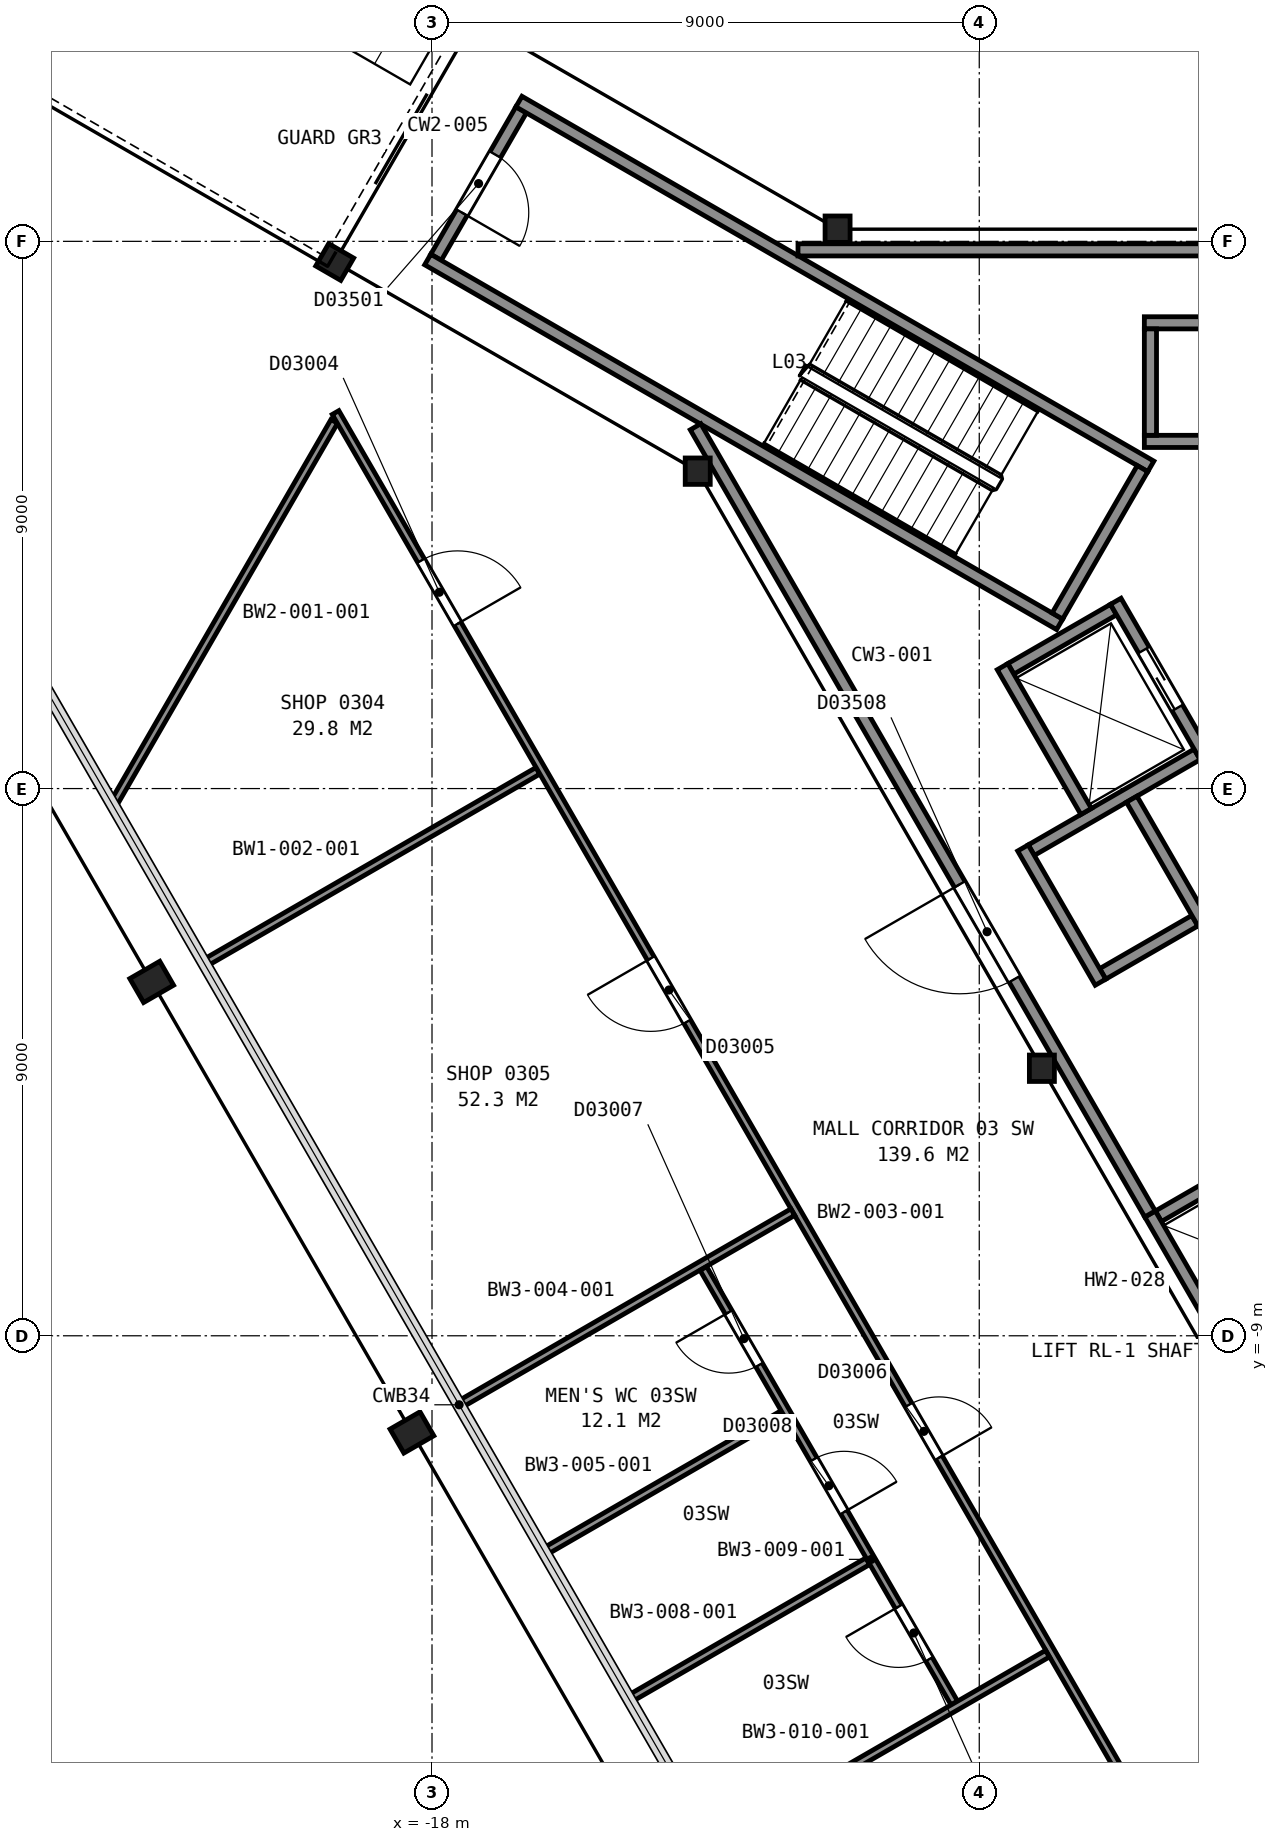
"""IFC4 building model, lengths in metres.
Left out: names, types, materials, properties, quantities, classifications, styles, units other than length and angle.
Written with IfcOpenShell. Run it as: python <this file> out.ifc"""

import sys

from ifc_helpers import new_model, si_unit, direction, frame, frame_2d, origin, origin_2d, place, context, subcontext, project, spatial, rectangle, i_section, extrude, element, fill, save


model = new_model("IFC4")
c1 = context("Model", 3, precision=1e-05, world=origin(), true_north=direction((0.0, 1.0)))
c2 = subcontext(c1, "Body", "Model", "MODEL_VIEW")
j1 = project(units=[si_unit("LENGTHUNIT", "METRE"), si_unit("PLANEANGLEUNIT", "RADIAN")], contexts=[c1])
p1 = place(None, origin())
s1 = spatial("IfcSite", under=j1, at=p1, CompositionType="ELEMENT")
p2 = place(p1, origin())
s2 = spatial("IfcBuilding", under=s1, at=p2, CompositionType="ELEMENT")
p3 = place(p2, frame((0.0, 0.0, 22.4)))
s3 = spatial("IfcBuildingStorey", under=s2, at=p3, CompositionType="ELEMENT", Elevation=22.4)
for number, where, z_axis, x_axis in (
    (1, (-22.61, -3.18, 0.0), (0.0, 0.0, 1.0), (-0.5, 0.866, 0.0)),
    (2, (-18.33, -10.59, 0.0), (0.0, 0.0, 1.0), (-0.5, 0.866, 0.0)),
):
    element("IfcColumn", number, at=place(p3, frame(where, z_axis=z_axis, x_axis=x_axis)), inside=s3, PredefinedType="COLUMN", context=c2, shape_type="SweptSolid", body=[
        extrude(i_section(OverallWidth=0.455, OverallDepth=0.569, WebThickness=0.078, FlangeThickness=0.125, FilletRadius=0.015, at=origin_2d()), origin(), (0.0, 0.0, 1.0), 4.8),
    ])
p4 = place(p3, frame((-11.33, 9.2, 0.0), z_axis=(0.0, 0.0, 1.0), x_axis=(1.0, 0.0, 0.0)))
e3 = element("IfcColumn", 3, at=p4, inside=s3, PredefinedType="COLUMN", context=c2, shape_type="SweptSolid", body=[
    extrude(i_section(OverallWidth=0.411, OverallDepth=0.434, WebThickness=0.036, FlangeThickness=0.057, FilletRadius=0.015, at=origin_2d()), origin(), (0.0, 0.0, 1.0), 4.8),
])
p5 = place(p3, frame((-19.6, 8.66, 0.0), z_axis=(0.0, 0.0, 1.0), x_axis=(0.5, 0.866025403784, 0.0)))
e4 = element("IfcColumn", 4, at=p5, inside=s3, PredefinedType="COLUMN", context=c2, shape_type="SweptSolid", body=[
    extrude(i_section(OverallWidth=0.424, OverallDepth=0.475, WebThickness=0.048, FlangeThickness=0.077, FilletRadius=0.015, at=origin_2d()), origin(), (0.0, 0.0, 1.0), 4.8),
])
for number, where, z_axis, x_axis in (
    (5, (-13.63, 5.22, 0.0), (0.0, 0.0, 1.0), (1.0, 0.0, 0.0)),
    (6, (-7.97, -4.6, 0.0), (0.0, 0.0, 1.0), (1.0, 0.0, 0.0)),
):
    element("IfcColumn", number, at=place(p3, frame(where, z_axis=z_axis, x_axis=x_axis)), inside=s3, PredefinedType="COLUMN", context=c2, shape_type="SweptSolid", body=[
        extrude(i_section(OverallWidth=0.411, OverallDepth=0.434, WebThickness=0.036, FlangeThickness=0.057, FilletRadius=0.015, at=origin_2d()), origin(), (0.0, 0.0, 1.0), 4.8),
    ])
p6 = place(p3, frame((-16.534, 11.162, 0.0), z_axis=(0.0, 0.0, 1.0), x_axis=(-0.49998411664, -0.866034573852, 0.0)))
e7 = element("IfcWall", 7, at=p6, inside=s3, PredefinedType="PARTITIONING", context=c2, shape_type="SweptSolid", body=[
    extrude(rectangle(XDim=2.8, YDim=0.2, at=frame_2d((1.4, 0.0))), origin(), (0.0, 0.0, 1.0), 4.55),
])
p7 = place(p6, frame((0.85, 0.0, 0.0)))
e8 = element("IfcOpeningElement", 8, at=p7, cuts=e7, PredefinedType="OPENING", context=c2, shape_type="SweptSolid", body=[
    extrude(rectangle(XDim=1.1, YDim=2.1, at=frame_2d((0.55, 1.05))), frame((0.0, 0.11, 0.0), z_axis=(0.0, -1.0, 0.0), x_axis=(1.0, 0.0, 0.0)), (0.0, 0.0, 1.0), 0.22),
])
for number, where, z_axis, x_axis in (
    (9, (-7.678, 2.701, 0.0), (0.0, 0.0, 1.0), (-0.866, 0.5, 0.0)),
    (10, (-6.178, 5.299, 0.0), (0.0, 0.0, 1.0), (-0.866, 0.5, 0.0)),
):
    element("IfcWall", number, at=place(p3, frame(where, z_axis=z_axis, x_axis=x_axis)), inside=s3, PredefinedType="PARTITIONING", context=c2, shape_type="SweptSolid", body=[
        extrude(rectangle(XDim=12.0, YDim=0.2, at=frame_2d((6.0, 0.0))), origin(), (0.0, 0.0, 1.0), 4.55),
    ])
p8 = place(p3, frame((-6.315, 5.262, 0.0), z_axis=(0.0, 0.0, 1.0), x_axis=(-0.500049511043, -0.865996816683, 0.0)))
e11 = element("IfcWall", 11, at=p8, inside=s3, PredefinedType="PARTITIONING", context=c2, shape_type="SweptSolid", body=[
    extrude(rectangle(XDim=2.8, YDim=0.2, at=frame_2d((1.4, 0.0))), origin(), (0.0, 0.0, 1.0), 4.55),
])
for number, where, z_axis, x_axis in (
    (12, (-6.285, 5.71, 0.0), (0.0, 0.0, 1.0), (1.0, 0.0, 0.0)),
    (13, (-6.285, 7.66, 0.0), (0.0, 0.0, 1.0), (1.0, 0.0, 0.0)),
):
    element("IfcWall", number, at=place(p3, frame(where, z_axis=z_axis, x_axis=x_axis)), inside=s3, PredefinedType="PARTITIONING", context=c2, shape_type="SweptSolid", body=[
        extrude(rectangle(XDim=2.35, YDim=0.2, at=frame_2d((1.175, 0.0))), origin(), (0.0, 0.0, 1.0), 4.8),
    ])
for number, where, z_axis, x_axis in (
    (14, (-6.054, -7.034, 0.0), (0.0, 0.0, 1.0), (0.866, 0.5, 0.0)),
    (15, (-6.97, -3.048, 0.0), (0.0, 0.0, 1.0), (0.866, 0.5, 0.0)),
):
    element("IfcWall", number, at=place(p3, frame(where, z_axis=z_axis, x_axis=x_axis)), inside=s3, PredefinedType="PARTITIONING", context=c2, shape_type="SweptSolid", body=[
        extrude(rectangle(XDim=1.75, YDim=0.2, at=frame_2d((0.875, 0.0))), origin(), (0.0, 0.0, 1.0), 4.8),
    ])
p9 = place(p3, frame((-8.145, -1.013, 0.0), z_axis=(0.0, 0.0, 1.0), x_axis=(0.866016494683, 0.500015430699, 0.0)))
e16 = element("IfcWall", 16, at=p9, inside=s3, PredefinedType="PARTITIONING", context=c2, shape_type="SweptSolid", body=[
    extrude(rectangle(XDim=3.15, YDim=0.2, at=frame_2d((1.575, 0.0))), origin(), (0.0, 0.0, 1.0), 4.8),
])
p10 = place(p3, frame((-8.48, 1.969, 0.0), z_axis=(0.0, 0.0, 1.0), x_axis=(0.866000020948, 0.500043961785, 0.0)))
e17 = element("IfcWall", 17, at=p10, inside=s3, PredefinedType="PARTITIONING", context=c2, shape_type="SweptSolid", body=[
    extrude(rectangle(XDim=1.95, YDim=0.2, at=frame_2d((0.975, 0.0))), origin(), (0.0, 0.0, 1.0), 4.8),
])
p11 = place(p3, frame((-6.185, 5.81, 0.0), z_axis=(0.0, 0.0, 1.0), x_axis=(0.0, 1.0, 0.0)))
e18 = element("IfcWall", 18, at=p11, inside=s3, PredefinedType="PARTITIONING", context=c2, shape_type="SweptSolid", body=[
    extrude(rectangle(XDim=1.75, YDim=0.2, at=frame_2d((0.875, 0.0))), origin(), (0.0, 0.0, 1.0), 4.8),
])
p12 = place(p3, frame((-5.28, 0.525, 0.0), z_axis=(0.0, 0.0, 1.0), x_axis=(-0.500037662692, 0.866003658127, 0.0)))
e19 = element("IfcWall", 19, at=p12, inside=s3, PredefinedType="PARTITIONING", context=c2, shape_type="SweptSolid", body=[
    extrude(rectangle(XDim=2.95, YDim=0.2, at=frame_2d((1.475, 0.0))), origin(), (0.0, 0.0, 1.0), 4.8),
])
p13 = place(p12, frame((0.925, 0.0, 0.0)))
e20 = element("IfcOpeningElement", 20, at=p13, cuts=e19, PredefinedType="OPENING", context=c2, shape_type="SweptSolid", body=[
    extrude(rectangle(XDim=1.1, YDim=2.1, at=frame_2d((0.55, 1.05))), frame((0.0, 0.11, 0.0), z_axis=(0.0, -1.0, 0.0), x_axis=(1.0, 0.0, 0.0)), (0.0, 0.0, 1.0), 0.22),
])
p14 = place(p3, frame((-5.318, -2.21, 0.0), z_axis=(0.0, 0.0, 1.0), x_axis=(-0.499938297808, 0.866061024631, 0.0)))
e21 = element("IfcWall", 21, at=p14, inside=s3, PredefinedType="PARTITIONING", context=c2, shape_type="SweptSolid", body=[
    extrude(rectangle(XDim=2.35, YDim=0.2, at=frame_2d((1.175, 0.0))), origin(), (0.0, 0.0, 1.0), 4.8),
])
p15 = place(p3, frame((-7.242, -0.376, 0.0), z_axis=(0.0, 0.0, 1.0), x_axis=(-0.499996545922, 0.866027397988, 0.0)))
e22 = element("IfcWall", 22, at=p15, inside=s3, PredefinedType="PARTITIONING", context=c2, shape_type="SweptSolid", body=[
    extrude(rectangle(XDim=2.75, YDim=0.2, at=frame_2d((1.375, 0.0))), origin(), (0.0, 0.0, 1.0), 4.8),
])
for number, where, z_axis, x_axis in (
    (23, (-7.006, -3.185, 0.0), (0.0, 0.0, 1.0), (-0.5, 0.866, 0.0)),
    (24, (-4.916, -9.206, 0.0), (0.0, 0.0, 1.0), (-0.5, 0.866, 0.0)),
):
    element("IfcWall", number, at=place(p3, frame(where, z_axis=z_axis, x_axis=x_axis)), inside=s3, PredefinedType="PARTITIONING", context=c2, shape_type="SweptSolid", body=[
        extrude(rectangle(XDim=2.55, YDim=0.2, at=frame_2d((1.275, 0.0))), origin(), (0.0, 0.0, 1.0), 4.8),
    ])
p16 = place(p3, frame((-13.666, 5.95, 0.0), z_axis=(0.0, 0.0, 1.0), x_axis=(0.499971736997, -0.866041720822, 0.0)))
e25 = element("IfcWall", 25, at=p16, inside=s3, PredefinedType="PARTITIONING", context=c2, shape_type="SweptSolid", body=[
    extrude(rectangle(XDim=14.949, YDim=0.2, at=frame_2d((7.475, 0.0))), origin(), (0.0, 0.0, 1.0), 4.55),
])
p17 = place(p16, frame((8.69, 0.0, 0.0)))
e26 = element("IfcOpeningElement", 26, at=p17, cuts=e25, PredefinedType="OPENING", context=c2, shape_type="SweptSolid", body=[
    extrude(rectangle(XDim=1.8, YDim=2.1, at=frame_2d((0.9, 1.05))), frame((0.0, 0.11, 0.0), z_axis=(0.0, -1.0, 0.0), x_axis=(1.0, 0.0, 0.0)), (0.0, 0.0, 1.0), 0.22),
])
p18 = place(p3, frame((11.986, 8.86, 0.0), z_axis=(0.0, 0.0, 1.0), x_axis=(-1.0, 0.0, 0.0)))
e27 = element("IfcWall", 27, at=p18, inside=s3, PredefinedType="PARTITIONING", context=c2, shape_type="SweptSolid", body=[
    extrude(rectangle(XDim=23.967, YDim=0.2, at=frame_2d((11.983, 0.0))), origin(), (0.0, 0.0, 1.0), 4.55),
])
p19 = place(p18, frame((7.596, 0.0, 0.0)))
e28 = element("IfcOpeningElement", 28, at=p19, cuts=e27, PredefinedType="OPENING", context=c2, shape_type="SweptSolid", body=[
    extrude(rectangle(XDim=1.8, YDim=2.1, at=frame_2d((0.9, 1.05))), frame((0.0, 0.11, 0.0), z_axis=(0.0, -1.0, 0.0), x_axis=(1.0, 0.0, 0.0)), (0.0, 0.0, 1.0), 0.22),
])
p20 = place(p3, frame((-23.25, -0.27, 0.0), z_axis=(0.0, 0.0, 1.0), x_axis=(0.500002873931, 0.866023744513, 0.0)))
e29 = element("IfcWall", 29, at=p20, inside=s3, PredefinedType="PARTITIONING", context=c2, shape_type="SweptSolid", body=[
    extrude(rectangle(XDim=7.285, YDim=0.125, at=frame_2d((3.643, 0.0))), origin(), (0.0, 0.0, 1.0), 4.64),
])
p21 = place(p3, frame((-21.746, -2.875, 0.0), z_axis=(0.0, 0.0, 1.0), x_axis=(0.866118237319, 0.499839173118, 0.0)))
e30 = element("IfcWall", 30, at=p21, inside=s3, PredefinedType="PARTITIONING", context=c2, shape_type="SweptSolid", body=[
    extrude(rectangle(XDim=6.337, YDim=0.125, at=frame_2d((3.169, 0.0))), origin(), (0.0, 0.0, 1.0), 3.653),
])
p22 = place(p3, frame((-4.438, -20.054, 0.0), z_axis=(0.0, 0.0, 1.0), x_axis=(-0.499994028088, 0.866028851642, 0.0)))
e31 = element("IfcWall", 31, at=p22, inside=s3, PredefinedType="PARTITIONING", context=c2, shape_type="SweptSolid", body=[
    extrude(rectangle(XDim=30.297, YDim=0.125, at=frame_2d((15.148, 0.0))), origin(), (0.0, 0.0, 1.0), 3.653),
])
p23 = place(p22, frame((26.285, 0.0, 0.0)))
e32 = element("IfcOpeningElement", 32, at=p23, cuts=e31, PredefinedType="OPENING", context=c2, shape_type="SweptSolid", body=[
    extrude(rectangle(XDim=1.2, YDim=2.1, at=frame_2d((0.6, 1.05))), frame((0.0, 0.073, 0.0), z_axis=(0.0, -1.0, 0.0), x_axis=(1.0, 0.0, 0.0)), (0.0, 0.0, 1.0), 0.145),
])
p24 = place(p22, frame((18.731, 0.0, 0.0)))
e33 = element("IfcOpeningElement", 33, at=p24, cuts=e31, PredefinedType="OPENING", context=c2, shape_type="SweptSolid", body=[
    extrude(rectangle(XDim=1.2, YDim=2.1, at=frame_2d((0.6, 1.05))), frame((0.0, 0.073, 0.0), z_axis=(0.0, -1.0, 0.0), x_axis=(1.0, 0.0, 0.0)), (0.0, 0.0, 1.0), 0.145),
])
p25 = place(p22, frame((10.449, 0.0, 0.0)))
e34 = element("IfcOpeningElement", 34, at=p25, cuts=e31, PredefinedType="OPENING", context=c2, shape_type="SweptSolid", body=[
    extrude(rectangle(XDim=1.0, YDim=2.1, at=frame_2d((0.5, 1.05))), frame((0.0, 0.073, 0.0), z_axis=(0.0, -1.0, 0.0), x_axis=(1.0, 0.0, 0.0)), (0.0, 0.0, 1.0), 0.145),
])
p26 = place(p22, frame((2.816, 0.0, 0.0)))
e35 = element("IfcOpeningElement", 35, at=p26, cuts=e31, PredefinedType="OPENING", context=c2, shape_type="SweptSolid", body=[
    extrude(rectangle(XDim=1.2, YDim=2.1, at=frame_2d((0.6, 1.05))), frame((0.0, 0.073, 0.0), z_axis=(0.0, -1.0, 0.0), x_axis=(1.0, 0.0, 0.0)), (0.0, 0.0, 1.0), 0.145),
])
p27 = place(p3, frame((-17.554, -10.135, 0.0), z_axis=(0.0, 0.0, 1.0), x_axis=(0.866003371142, 0.500038159714, 0.0)))
e36 = element("IfcWall", 36, at=p27, inside=s3, PredefinedType="PARTITIONING", context=c2, shape_type="SweptSolid", body=[
    extrude(rectangle(XDim=6.337, YDim=0.125, at=frame_2d((3.168, 0.0))), origin(), (0.0, 0.0, 1.0), 3.653),
])
p28 = place(p3, frame((-16.157, -12.555, 0.0), z_axis=(0.0, 0.0, 1.0), x_axis=(0.866009042838, 0.50002833692, 0.0)))
e37 = element("IfcWall", 37, at=p28, inside=s3, PredefinedType="PARTITIONING", context=c2, shape_type="SweptSolid", body=[
    extrude(rectangle(XDim=4.537, YDim=0.125, at=frame_2d((2.269, 0.0))), origin(), (0.0, 0.0, 1.0), 4.64),
])
p29 = place(p3, frame((-14.76, -14.975, 0.0), z_axis=(0.0, 0.0, 1.0), x_axis=(0.866030417568, 0.499991315771, 0.0)))
e38 = element("IfcWall", 38, at=p29, inside=s3, PredefinedType="PARTITIONING", context=c2, shape_type="SweptSolid", body=[
    extrude(rectangle(XDim=4.533, YDim=0.125, at=frame_2d((2.266, 0.0))), origin(), (0.0, 0.0, 1.0), 4.64),
])
p30 = place(p3, frame((-9.41, -15.041, 0.0), z_axis=(0.0, 0.0, 1.0), x_axis=(-0.500068128175, 0.865986066391, 0.0)))
e39 = element("IfcWall", 39, at=p30, inside=s3, PredefinedType="PARTITIONING", context=c2, shape_type="SweptSolid", body=[
    extrude(rectangle(XDim=8.253, YDim=0.125, at=frame_2d((4.126, 0.0))), origin(), (0.0, 0.0, 1.0), 4.64),
])
p31 = place(p30, frame((6.421, 0.0, 0.0)))
e40 = element("IfcOpeningElement", 40, at=p31, cuts=e39, PredefinedType="OPENING", context=c2, shape_type="SweptSolid", body=[
    extrude(rectangle(XDim=1.0, YDim=2.1, at=frame_2d((0.5, 1.05))), frame((0.0, 0.073, 0.0), z_axis=(0.0, -1.0, 0.0), x_axis=(1.0, 0.0, 0.0)), (0.0, 0.0, 1.0), 0.145),
])
p32 = place(p30, frame((3.627, 0.0, 0.0)))
e41 = element("IfcOpeningElement", 41, at=p32, cuts=e39, PredefinedType="OPENING", context=c2, shape_type="SweptSolid", body=[
    extrude(rectangle(XDim=1.0, YDim=2.1, at=frame_2d((0.5, 1.05))), frame((0.0, 0.073, 0.0), z_axis=(0.0, -1.0, 0.0), x_axis=(1.0, 0.0, 0.0)), (0.0, 0.0, 1.0), 0.145),
])
p33 = place(p30, frame((0.832, 0.0, 0.0)))
e42 = element("IfcOpeningElement", 42, at=p33, cuts=e39, PredefinedType="OPENING", context=c2, shape_type="SweptSolid", body=[
    extrude(rectangle(XDim=1.0, YDim=2.1, at=frame_2d((0.5, 1.05))), frame((0.0, 0.073, 0.0), z_axis=(0.0, -1.0, 0.0), x_axis=(1.0, 0.0, 0.0)), (0.0, 0.0, 1.0), 0.145),
])
p34 = place(p3, frame((-13.363, -17.395, 0.0), z_axis=(0.0, 0.0, 1.0), x_axis=(0.866044997331, 0.499966061446, 0.0)))
e43 = element("IfcWall", 43, at=p34, inside=s3, PredefinedType="PARTITIONING", context=c2, shape_type="SweptSolid", body=[
    extrude(rectangle(XDim=6.333, YDim=0.125, at=frame_2d((3.167, 0.0))), origin(), (0.0, 0.0, 1.0), 3.653),
])
p35 = place(p7, origin())
e44 = element("IfcDoor", 44, at=p35, inside=s3, OperationType="SINGLE_SWING_RIGHT", PredefinedType="DOOR", context=c2, shape_type="SweptSolid", body=[
    extrude(rectangle(XDim=1.1, YDim=2.1, at=frame_2d((0.55, 1.05))), frame((0.0, 0.025, 0.0), z_axis=(0.0, -1.0, 0.0), x_axis=(1.0, 0.0, 0.0)), (0.0, 0.0, 1.0), 0.05),
])
fill(e8, e44)
p36 = place(p13, origin())
e45 = element("IfcDoor", 45, at=p36, inside=s3, OperationType="SLIDING_TO_LEFT", PredefinedType="DOOR", context=c2, shape_type="SweptSolid", body=[
    extrude(rectangle(XDim=1.1, YDim=2.1, at=frame_2d((0.55, 1.05))), frame((0.0, 0.025, 0.0), z_axis=(0.0, -1.0, 0.0), x_axis=(1.0, 0.0, 0.0)), (0.0, 0.0, 1.0), 0.05),
])
fill(e20, e45)
p37 = place(p17, origin())
e46 = element("IfcDoor", 46, at=p37, inside=s3, OperationType="DOUBLE_DOOR_SINGLE_SWING", PredefinedType="DOOR", context=c2, shape_type="SweptSolid", body=[
    extrude(rectangle(XDim=1.8, YDim=2.1, at=frame_2d((0.9, 1.05))), frame((0.0, 0.025, 0.0), z_axis=(0.0, -1.0, 0.0), x_axis=(1.0, 0.0, 0.0)), (0.0, 0.0, 1.0), 0.05),
])
fill(e26, e46)
p38 = place(p23, origin())
e47 = element("IfcDoor", 47, at=p38, inside=s3, OperationType="SINGLE_SWING_LEFT", PredefinedType="DOOR", context=c2, shape_type="SweptSolid", body=[
    extrude(rectangle(XDim=1.2, YDim=2.1, at=frame_2d((0.6, 1.05))), frame((0.0, 0.025, 0.0), z_axis=(0.0, -1.0, 0.0), x_axis=(1.0, 0.0, 0.0)), (0.0, 0.0, 1.0), 0.05),
])
fill(e32, e47)
p39 = place(p24, origin())
e48 = element("IfcDoor", 48, at=p39, inside=s3, OperationType="SINGLE_SWING_RIGHT", PredefinedType="DOOR", context=c2, shape_type="SweptSolid", body=[
    extrude(rectangle(XDim=1.2, YDim=2.1, at=frame_2d((0.6, 1.05))), frame((0.0, 0.025, 0.0), z_axis=(0.0, -1.0, 0.0), x_axis=(1.0, 0.0, 0.0)), (0.0, 0.0, 1.0), 0.05),
])
fill(e33, e48)
p40 = place(p25, origin())
e49 = element("IfcDoor", 49, at=p40, inside=s3, OperationType="SINGLE_SWING_LEFT", PredefinedType="DOOR", context=c2, shape_type="SweptSolid", body=[
    extrude(rectangle(XDim=1.0, YDim=2.1, at=frame_2d((0.5, 1.05))), frame((0.0, 0.025, 0.0), z_axis=(0.0, -1.0, 0.0), x_axis=(1.0, 0.0, 0.0)), (0.0, 0.0, 1.0), 0.05),
])
fill(e34, e49)
p41 = place(p31, origin())
e50 = element("IfcDoor", 50, at=p41, inside=s3, OperationType="SINGLE_SWING_RIGHT", PredefinedType="DOOR", context=c2, shape_type="SweptSolid", body=[
    extrude(rectangle(XDim=1.0, YDim=2.1, at=frame_2d((0.5, 1.05))), frame((0.0, 0.025, 0.0), z_axis=(0.0, -1.0, 0.0), x_axis=(1.0, 0.0, 0.0)), (0.0, 0.0, 1.0), 0.05),
])
fill(e40, e50)
p42 = place(p32, origin())
e51 = element("IfcDoor", 51, at=p42, inside=s3, OperationType="SINGLE_SWING_LEFT", PredefinedType="DOOR", context=c2, shape_type="SweptSolid", body=[
    extrude(rectangle(XDim=1.0, YDim=2.1, at=frame_2d((0.5, 1.05))), frame((0.0, 0.025, 0.0), z_axis=(0.0, -1.0, 0.0), x_axis=(1.0, 0.0, 0.0)), (0.0, 0.0, 1.0), 0.05),
])
fill(e41, e51)
p43 = place(p33, origin())
e52 = element("IfcDoor", 52, at=p43, inside=s3, OperationType="SINGLE_SWING_RIGHT", PredefinedType="DOOR", context=c2, shape_type="SweptSolid", body=[
    extrude(rectangle(XDim=1.0, YDim=2.1, at=frame_2d((0.5, 1.05))), frame((0.0, 0.025, 0.0), z_axis=(0.0, -1.0, 0.0), x_axis=(1.0, 0.0, 0.0)), (0.0, 0.0, 1.0), 0.05),
])
fill(e42, e52)
save(model, sys.argv[1])
